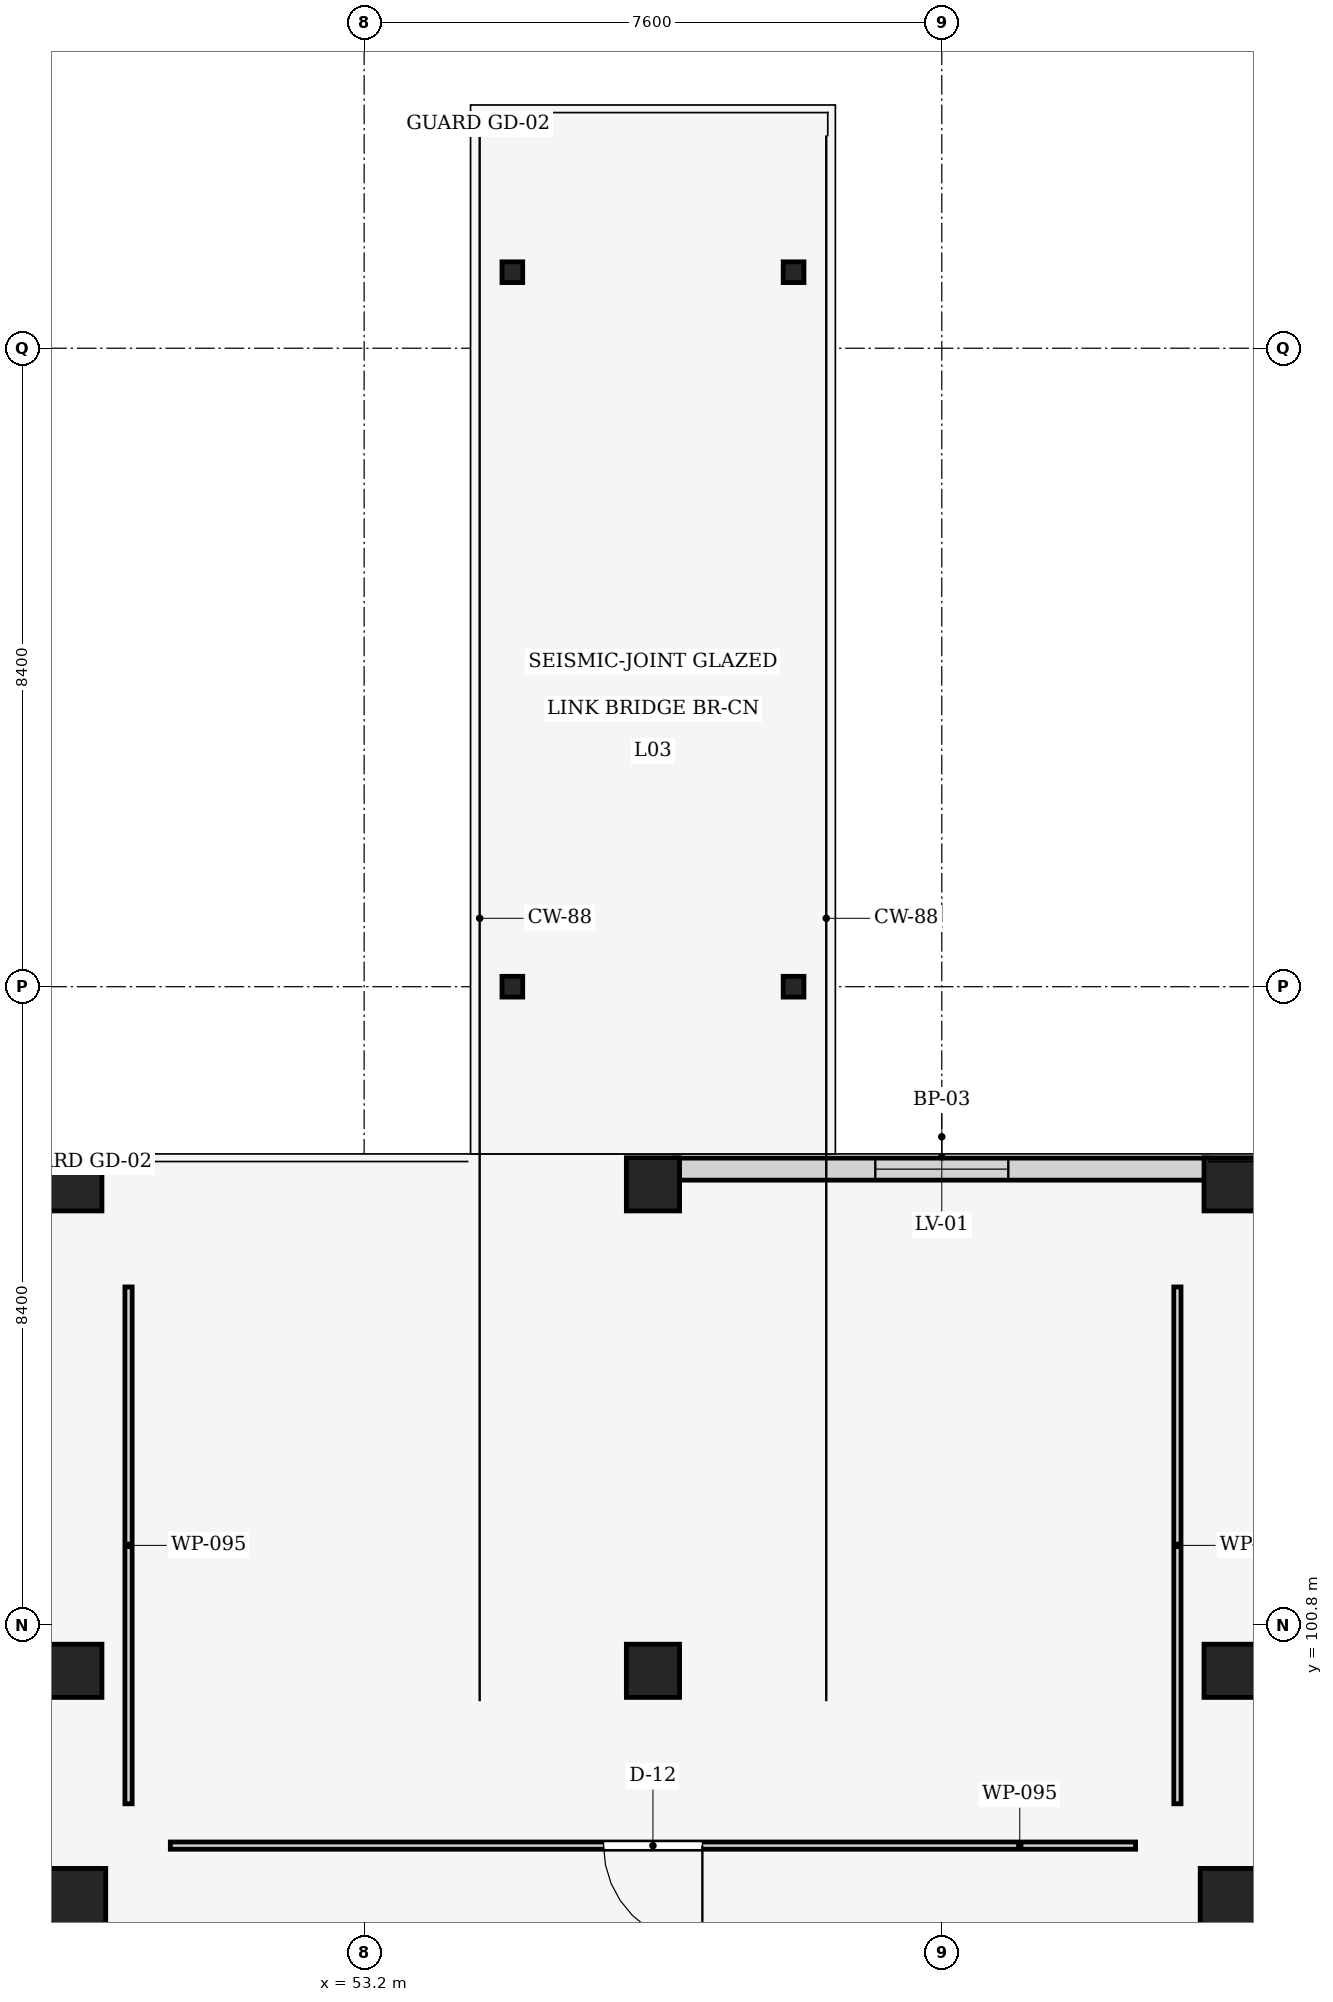
"""IFC4 building model, lengths in metres.
Left out: names, types, materials, properties, quantities, classifications, styles, units other than length and angle.
Written with IfcOpenShell. Run it as: python <this file> out.ifc"""

import sys

from ifc_helpers import new_model, si_unit, direction, frame, frame_2d, origin, origin_2d, place, context, subcontext, project, spatial, rectangle, hollow_circle, extrude, element, fill, save


model = new_model("IFC4")
c1 = context("Model", 3, precision=1e-05, world=origin(), true_north=direction((0.0, 1.0)))
c2 = subcontext(c1, "Body", "Model", "MODEL_VIEW")
j1 = project(units=[si_unit("LENGTHUNIT", "METRE"), si_unit("PLANEANGLEUNIT", "RADIAN")], contexts=[c1])
p1 = place(None, origin())
s1 = spatial("IfcSite", under=j1, at=p1, CompositionType="ELEMENT")
p2 = place(p1, origin())
s2 = spatial("IfcBuilding", under=s1, at=p2, CompositionType="ELEMENT")
p3 = place(p2, frame((0.0, 0.0, 13.2)))
s3 = spatial("IfcBuildingStorey", under=s2, at=p3, CompositionType="ELEMENT", Elevation=13.2)
for number, where, z_axis, x_axis in (
    (1, (49.4, 97.2, 0.0), (0.0, 0.0, 1.0), (1.0, 0.0, 0.0)),
    (2, (64.6, 97.2, 0.0), (0.0, 0.0, 1.0), (1.0, 0.0, 0.0)),
):
    element("IfcColumn", number, at=place(p3, frame(where, z_axis=z_axis, x_axis=x_axis)), inside=s3, PredefinedType="COLUMN", context=c2, shape_type="SweptSolid", body=[
        extrude(rectangle(XDim=0.8, YDim=0.8, at=origin_2d()), origin(), (0.0, 0.0, 1.0), 4.05),
    ])
for number, where, z_axis, x_axis in (
    (3, (49.4, 100.2, 0.0), (0.0, 0.0, 1.0), (1.0, 0.0, 0.0)),
    (4, (57.0, 100.2, 0.0), (0.0, 0.0, 1.0), (1.0, 0.0, 0.0)),
    (5, (64.6, 100.2, 0.0), (0.0, 0.0, 1.0), (1.0, 0.0, 0.0)),
    (6, (49.4, 106.6, 0.0), (0.0, 0.0, 1.0), (1.0, 0.0, 0.0)),
    (7, (57.0, 106.6, 0.0), (0.0, 0.0, 1.0), (1.0, 0.0, 0.0)),
    (8, (64.6, 106.6, 0.0), (0.0, 0.0, 1.0), (1.0, 0.0, 0.0)),
):
    element("IfcColumn", number, at=place(p3, frame(where, z_axis=z_axis, x_axis=x_axis)), inside=s3, PredefinedType="COLUMN", context=c2, shape_type="SweptSolid", body=[
        extrude(rectangle(XDim=0.7, YDim=0.7, at=origin_2d()), origin(), (0.0, 0.0, 1.0), 4.05),
    ])
for number, where, z_axis, x_axis in (
    (9, (55.15, 109.2, 0.0), (0.0, 0.0, 1.0), (1.0, 0.0, 0.0)),
    (10, (58.85, 109.2, 0.0), (0.0, 0.0, 1.0), (1.0, 0.0, 0.0)),
    (11, (58.85, 118.6, 0.0), (0.0, 0.0, 1.0), (1.0, 0.0, 0.0)),
    (12, (55.15, 118.6, 0.0), (0.0, 0.0, 1.0), (1.0, 0.0, 0.0)),
):
    element("IfcColumn", number, at=place(p3, frame(where, z_axis=z_axis, x_axis=x_axis)), inside=s3, PredefinedType="COLUMN", context=c2, shape_type="SweptSolid", body=[
        extrude(hollow_circle(Radius=0.136, WallThickness=0.016, at=origin_2d()), origin(), (0.0, 0.0, 1.0), 3.82),
    ])
p4 = place(p3, frame((57.285, 106.8, 0.0), z_axis=(0.0, 0.0, 1.0), x_axis=(1.0, 0.0, 0.0)))
e13 = element("IfcWall", 13, at=p4, inside=s3, PredefinedType="STANDARD", context=c2, shape_type="SweptSolid", body=[
    extrude(rectangle(XDim=7.03, YDim=0.29, at=frame_2d((3.515, 0.0))), origin(), (0.0, 0.0, 1.0), 3.165),
])
p5 = place(p4, frame((2.64, 0.0, 0.85)))
e14 = element("IfcOpeningElement", 14, at=p5, cuts=e13, PredefinedType="OPENING", context=c2, shape_type="SweptSolid", body=[
    extrude(rectangle(XDim=1.75, YDim=1.85, at=frame_2d((0.875, 0.925))), frame((0.0, 0.155, 0.0), z_axis=(0.0, -1.0, 0.0), x_axis=(1.0, 0.0, 0.0)), (0.0, 0.0, 1.0), 0.31),
])
p6 = place(p3, frame((63.35, 97.9, 0.0), z_axis=(0.0, 0.0, 1.0), x_axis=(-1.0, 0.0, 0.0)))
e15 = element("IfcWall", 15, at=p6, inside=s3, PredefinedType="PARTITIONING", context=c2, shape_type="SweptSolid", body=[
    extrude(rectangle(XDim=12.7, YDim=0.095, at=frame_2d((6.35, 0.0))), origin(), (0.0, 0.0, 1.0), 3.7),
])
p7 = place(p6, frame((5.7, 0.0, 0.0)))
e16 = element("IfcOpeningElement", 16, at=p7, cuts=e15, PredefinedType="OPENING", context=c2, shape_type="SweptSolid", body=[
    extrude(rectangle(XDim=1.3, YDim=2.22, at=frame_2d((0.65, 1.11))), frame((0.0, 0.057, 0.0), z_axis=(0.0, -1.0, 0.0), x_axis=(1.0, 0.0, 0.0)), (0.0, 0.0, 1.0), 0.115),
])
for number, where, z_axis, x_axis in (
    (17, (63.9, 105.25, 0.0), (0.0, 0.0, 1.0), (0.0, -1.0, 0.0)),
    (18, (50.1, 98.45, 0.0), (0.0, 0.0, 1.0), (0.0, 1.0, 0.0)),
):
    element("IfcWall", number, at=place(p3, frame(where, z_axis=z_axis, x_axis=x_axis)), inside=s3, PredefinedType="PARTITIONING", context=c2, shape_type="SweptSolid", body=[
        extrude(rectangle(XDim=6.8, YDim=0.095, at=frame_2d((3.4, 0.0))), origin(), (0.0, 0.0, 1.0), 3.165),
    ])
p8 = place(p5, origin())
e19 = element("IfcWindow", 19, at=p8, inside=s3, PartitioningType="SINGLE_PANEL", PredefinedType="WINDOW", context=c2, shape_type="SweptSolid", body=[
    extrude(rectangle(XDim=1.75, YDim=1.85, at=frame_2d((0.875, 0.925))), frame((0.0, 0.03, 0.0), z_axis=(0.0, -1.0, 0.0), x_axis=(1.0, 0.0, 0.0)), (0.0, 0.0, 1.0), 0.06),
])
fill(e14, e19)
p9 = place(p7, origin())
e20 = element("IfcDoor", 20, at=p9, inside=s3, OperationType="SINGLE_SWING_LEFT", PredefinedType="DOOR", context=c2, shape_type="SweptSolid", body=[
    extrude(rectangle(XDim=1.3, YDim=2.22, at=frame_2d((0.65, 1.11))), frame((0.0, 0.025, 0.0), z_axis=(0.0, -1.0, 0.0), x_axis=(1.0, 0.0, 0.0)), (0.0, 0.0, 1.0), 0.05),
])
fill(e16, e20)
save(model, sys.argv[1])
